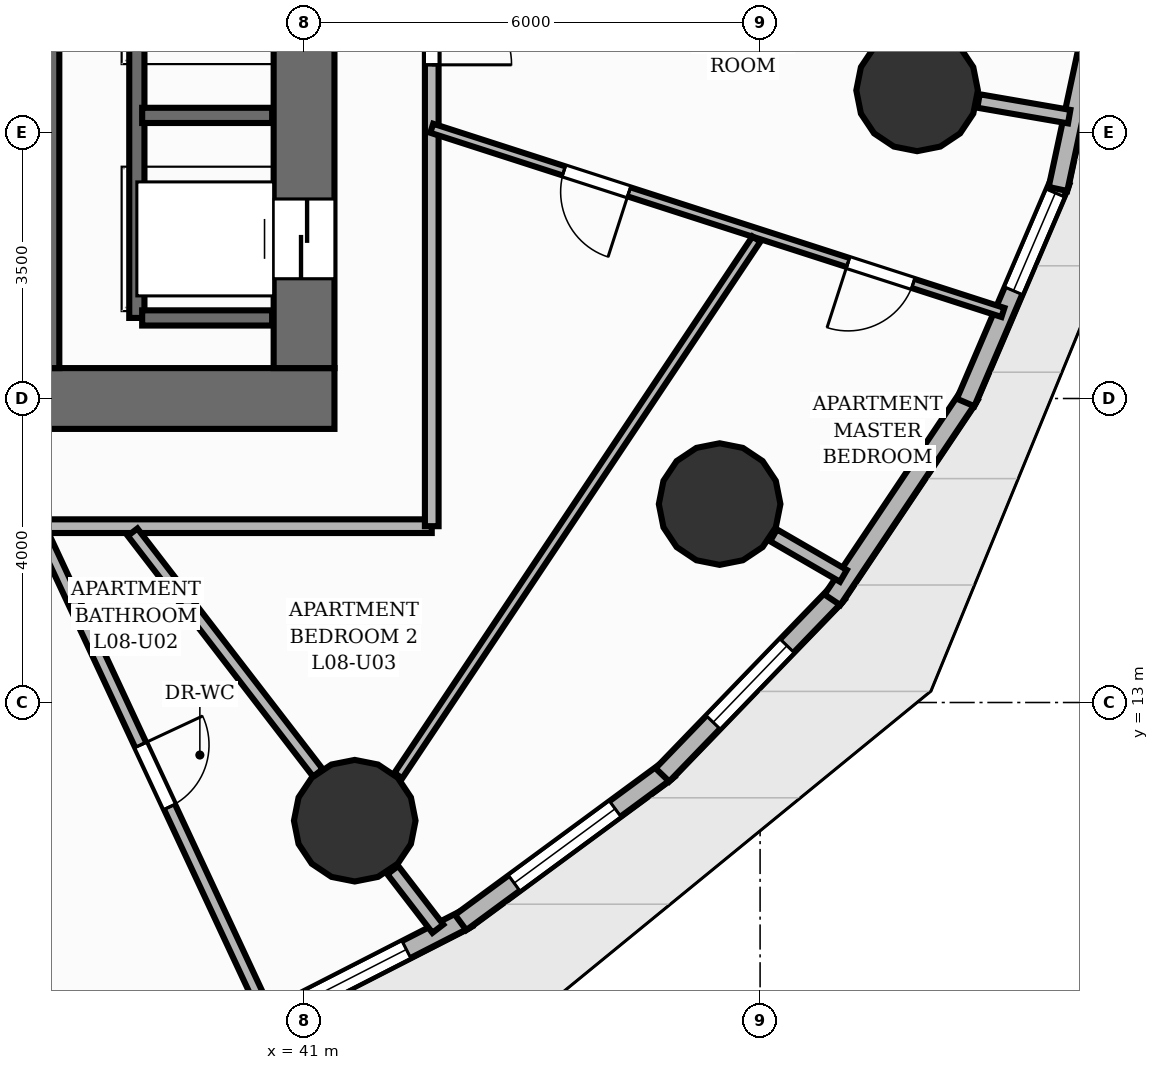
"""IFC4 building model, lengths in metres.
Left out: names, types, materials, properties, quantities, classifications, styles, units other than length and angle.
Written with IfcOpenShell. Run it as: python <this file> out.ifc"""

import sys

from ifc_helpers import new_model, si_unit, direction, frame, frame_2d, origin, origin_2d, place, context, subcontext, project, spatial, rectangle, circle, extrude, element, fill, save


model = new_model("IFC4")
c1 = context("Model", 3, precision=1e-05, world=origin(), true_north=direction((0.0, 1.0)))
c2 = subcontext(c1, "Body", "Model", "MODEL_VIEW")
j1 = project(units=[si_unit("LENGTHUNIT", "METRE"), si_unit("PLANEANGLEUNIT", "RADIAN")], contexts=[c1])
p1 = place(None, origin())
s1 = spatial("IfcSite", under=j1, at=p1, CompositionType="ELEMENT")
p2 = place(p1, origin())
s2 = spatial("IfcBuilding", under=s1, at=p2, CompositionType="ELEMENT")
p3 = place(p2, frame((0.0, 0.0, 31.2)))
s3 = spatial("IfcBuildingStorey", under=s2, at=p3, CompositionType="ELEMENT", Elevation=31.2)
p4 = place(p3, frame((22.6, 17.0, 0.0), z_axis=(0.0, 0.0, 1.0), x_axis=(1.0, 0.0, 0.0)))
e1 = element("IfcWall", 1, at=p4, inside=s3, PredefinedType="SHEAR", context=c2, shape_type="SweptSolid", body=[
    extrude(rectangle(XDim=18.8, YDim=0.8, at=frame_2d((9.4, 0.0))), origin(), (0.0, 0.0, 1.0), 3.2),
])
p5 = place(p4, frame((5.9, 0.0, 0.0)))
e2 = element("IfcOpeningElement", 2, at=p5, cuts=e1, PredefinedType="OPENING", context=c2, shape_type="SweptSolid", body=[
    extrude(rectangle(XDim=1.1, YDim=2.15, at=frame_2d((0.55, 1.075))), frame((0.0, 0.41, 0.0), z_axis=(0.0, -1.0, 0.0), x_axis=(1.0, 0.0, 0.0)), (0.0, 0.0, 1.0), 0.82),
])
p6 = place(p4, frame((9.45, 0.0, 0.0)))
e3 = element("IfcOpeningElement", 3, at=p6, cuts=e1, PredefinedType="OPENING", context=c2, shape_type="SweptSolid", body=[
    extrude(rectangle(XDim=0.9, YDim=2.1, at=frame_2d((0.45, 1.05))), frame((0.0, 0.41, 0.0), z_axis=(0.0, -1.0, 0.0), x_axis=(1.0, 0.0, 0.0)), (0.0, 0.0, 1.0), 0.82),
])
p7 = place(p3, frame((41.0, 17.4, 0.0), z_axis=(0.0, 0.0, 1.0), x_axis=(0.0, 1.0, 0.0)))
e4 = element("IfcWall", 4, at=p7, inside=s3, PredefinedType="SHEAR", context=c2, shape_type="SweptSolid", body=[
    extrude(rectangle(XDim=13.2, YDim=0.8, at=frame_2d((6.6, 0.0))), origin(), (0.0, 0.0, 1.0), 3.2),
])
p8 = place(p7, frame((1.175, 0.0, 0.0)))
e5 = element("IfcOpeningElement", 5, at=p8, cuts=e4, PredefinedType="OPENING", context=c2, shape_type="SweptSolid", body=[
    extrude(rectangle(XDim=1.05, YDim=2.15, at=frame_2d((0.525, 1.075))), frame((0.0, 0.41, 0.0), z_axis=(0.0, -1.0, 0.0), x_axis=(1.0, 0.0, 0.0)), (0.0, 0.0, 1.0), 0.82),
])
p9 = place(p7, frame((4.425, 0.0, 0.0)))
e6 = element("IfcOpeningElement", 6, at=p9, cuts=e4, PredefinedType="OPENING", context=c2, shape_type="SweptSolid", body=[
    extrude(rectangle(XDim=1.05, YDim=2.15, at=frame_2d((0.525, 1.075))), frame((0.0, 0.41, 0.0), z_axis=(0.0, -1.0, 0.0), x_axis=(1.0, 0.0, 0.0)), (0.0, 0.0, 1.0), 0.82),
])
p10 = place(p7, frame((7.725, 0.0, 0.0)))
e7 = element("IfcOpeningElement", 7, at=p10, cuts=e4, PredefinedType="OPENING", context=c2, shape_type="SweptSolid", body=[
    extrude(rectangle(XDim=1.05, YDim=2.15, at=frame_2d((0.525, 1.075))), frame((0.0, 0.41, 0.0), z_axis=(0.0, -1.0, 0.0), x_axis=(1.0, 0.0, 0.0)), (0.0, 0.0, 1.0), 0.82),
])
p11 = place(p7, frame((10.975, 0.0, 0.0)))
e8 = element("IfcOpeningElement", 8, at=p11, cuts=e4, PredefinedType="OPENING", context=c2, shape_type="SweptSolid", body=[
    extrude(rectangle(XDim=1.05, YDim=2.15, at=frame_2d((0.525, 1.075))), frame((0.0, 0.41, 0.0), z_axis=(0.0, -1.0, 0.0), x_axis=(1.0, 0.0, 0.0)), (0.0, 0.0, 1.0), 0.82),
])
p12 = place(p3, frame((37.5, 17.4, 0.0), z_axis=(0.0, 0.0, 1.0), x_axis=(0.0, 1.0, 0.0)))
e9 = element("IfcWall", 9, at=p12, inside=s3, PredefinedType="SHEAR", context=c2, shape_type="SweptSolid", body=[
    extrude(rectangle(XDim=13.2, YDim=0.56, at=frame_2d((6.6, 0.0))), origin(), (0.0, 0.0, 1.0), 3.2),
])
for number, where, z_axis, x_axis in (
    (10, (41.667, 11.445, 0.0), (0.0, 0.0, 1.0), (1.0, 0.0, 0.0)),
    (11, (46.468, 15.611, 0.0), (0.0, 0.0, 1.0), (1.0, 0.0, 0.0)),
    (12, (49.066, 21.054, 0.0), (0.0, 0.0, 1.0), (1.0, 0.0, 0.0)),
):
    element("IfcColumn", number, at=place(p3, frame(where, z_axis=z_axis, x_axis=x_axis)), inside=s3, PredefinedType="COLUMN", context=c2, shape_type="SweptSolid", body=[
        extrude(circle(Radius=0.8, at=origin_2d()), origin(), (0.0, 0.0, 1.0), 3.2),
    ])
p13 = place(p3, frame((43.153, 10.164, 0.0), z_axis=(0.0, 0.0, 1.0), x_axis=(-0.890260122421, -0.455452428281, 0.0)))
e13 = element("IfcWall", 13, at=p13, inside=s3, PredefinedType="SOLIDWALL", context=c2, shape_type="SweptSolid", body=[
    extrude(rectangle(XDim=3.465, YDim=0.25, at=frame_2d((1.732, 0.0))), origin(), (0.0, 0.0, 1.0), 2.96),
])
p14 = place(p13, frame((0.907, 0.0, 0.85)))
e14 = element("IfcOpeningElement", 14, at=p14, cuts=e13, PredefinedType="OPENING", context=c2, shape_type="SweptSolid", body=[
    extrude(rectangle(XDim=1.65, YDim=1.55, at=frame_2d((0.825, 0.775))), frame((0.0, 0.135, 0.0), z_axis=(0.0, -1.0, 0.0), x_axis=(1.0, 0.0, 0.0)), (0.0, 0.0, 1.0), 0.27),
])
p15 = place(p3, frame((45.798, 12.12, 0.0), z_axis=(0.0, 0.0, 1.0), x_axis=(-0.805405938507, -0.592723606935, 0.0)))
e15 = element("IfcWall", 15, at=p15, inside=s3, PredefinedType="SOLIDWALL", context=c2, shape_type="SweptSolid", body=[
    extrude(rectangle(XDim=3.399, YDim=0.25, at=frame_2d((1.699, 0.0))), origin(), (0.0, 0.0, 1.0), 2.96),
])
p16 = place(p15, frame((0.875, 0.0, 0.85)))
e16 = element("IfcOpeningElement", 16, at=p16, cuts=e15, PredefinedType="OPENING", context=c2, shape_type="SweptSolid", body=[
    extrude(rectangle(XDim=1.65, YDim=1.55, at=frame_2d((0.825, 0.775))), frame((0.0, 0.135, 0.0), z_axis=(0.0, -1.0, 0.0), x_axis=(1.0, 0.0, 0.0)), (0.0, 0.0, 1.0), 0.27),
])
p17 = place(p3, frame((48.021, 14.438, 0.0), z_axis=(0.0, 0.0, 1.0), x_axis=(-0.694392538781, -0.719596416115, 0.0)))
e17 = element("IfcWall", 17, at=p17, inside=s3, PredefinedType="SOLIDWALL", context=c2, shape_type="SweptSolid", body=[
    extrude(rectangle(XDim=3.323, YDim=0.25, at=frame_2d((1.661, 0.0))), origin(), (0.0, 0.0, 1.0), 2.96),
])
p18 = place(p17, frame((0.961, 0.0, 0.85)))
e18 = element("IfcOpeningElement", 18, at=p18, cuts=e17, PredefinedType="OPENING", context=c2, shape_type="SweptSolid", body=[
    extrude(rectangle(XDim=1.4, YDim=1.55, at=frame_2d((0.7, 0.775))), frame((0.0, 0.135, 0.0), z_axis=(0.0, -1.0, 0.0), x_axis=(1.0, 0.0, 0.0)), (0.0, 0.0, 1.0), 0.27),
])
p19 = place(p3, frame((49.758, 17.047, 0.0), z_axis=(0.0, 0.0, 1.0), x_axis=(-0.556764929833, -0.83067009872, 0.0)))
e19 = element("IfcWall", 19, at=p19, inside=s3, PredefinedType="SOLIDWALL", context=c2, shape_type="SweptSolid", body=[
    extrude(rectangle(XDim=3.244, YDim=0.25, at=frame_2d((1.622, 0.0))), origin(), (0.0, 0.0, 1.0), 2.96),
])
p20 = place(p3, frame((50.954, 19.865, 0.0), z_axis=(0.0, 0.0, 1.0), x_axis=(-0.393733630937, -0.91922457967, 0.0)))
e20 = element("IfcWall", 20, at=p20, inside=s3, PredefinedType="SOLIDWALL", context=c2, shape_type="SweptSolid", body=[
    extrude(rectangle(XDim=3.174, YDim=0.25, at=frame_2d((1.587, 0.0))), origin(), (0.0, 0.0, 1.0), 2.96),
])
p21 = place(p20, frame((0.175, 0.0, 0.85)))
e21 = element("IfcOpeningElement", 21, at=p21, cuts=e20, PredefinedType="OPENING", context=c2, shape_type="SweptSolid", body=[
    extrude(rectangle(XDim=1.4, YDim=1.55, at=frame_2d((0.7, 0.775))), frame((0.0, 0.135, 0.0), z_axis=(0.0, -1.0, 0.0), x_axis=(1.0, 0.0, 0.0)), (0.0, 0.0, 1.0), 0.27),
])
p22 = place(p3, frame((51.573, 22.808, 0.0), z_axis=(0.0, 0.0, 1.0), x_axis=(-0.209668000253, -0.977772637002, 0.0)))
e22 = element("IfcWall", 22, at=p22, inside=s3, PredefinedType="SOLIDWALL", context=c2, shape_type="SweptSolid", body=[
    extrude(rectangle(XDim=3.121, YDim=0.25, at=frame_2d((1.56, 0.0))), origin(), (0.0, 0.0, 1.0), 2.96),
])
p23 = place(p3, frame((38.8, 18.06, 0.0), z_axis=(0.0, 0.0, 1.0), x_axis=(0.0, 1.0, 0.0)))
e23 = element("IfcWall", 23, at=p23, inside=s3, PredefinedType="SHEAR", context=c2, shape_type="SweptSolid", body=[
    extrude(rectangle(XDim=11.88, YDim=0.2, at=frame_2d((5.94, 0.0))), origin(), (0.0, 0.0, 1.0), 3.2),
])
for number, where, z_axis, x_axis in (
    (24, (38.87, 18.06, 0.0), (0.0, 0.0, 1.0), (1.0, 0.0, 0.0)),
    (25, (38.87, 20.725, 0.0), (0.0, 0.0, 1.0), (1.0, 0.0, 0.0)),
):
    element("IfcWall", number, at=place(p3, frame(where, z_axis=z_axis, x_axis=x_axis)), inside=s3, PredefinedType="SHEAR", context=c2, shape_type="SweptSolid", body=[
        extrude(rectangle(XDim=1.71, YDim=0.2, at=frame_2d((0.855, 0.0))), origin(), (0.0, 0.0, 1.0), 3.2),
    ])
p24 = place(p3, frame((42.167, 10.795, 0.0), z_axis=(0.0, 0.0, 1.0), x_axis=(0.609953343804, -0.792437327732, 0.0)))
e26 = element("IfcWall", 26, at=p24, inside=s3, PredefinedType="PARTITIONING", context=c2, shape_type="SweptSolid", body=[
    extrude(rectangle(XDim=0.973, YDim=0.18, at=frame_2d((0.486, 0.0))), origin(), (0.0, 0.0, 1.0), 2.178),
])
p25 = place(p3, frame((47.177, 15.2, 0.0), z_axis=(0.0, 0.0, 1.0), x_axis=(0.865001274409, -0.501769663562, 0.0)))
e27 = element("IfcWall", 27, at=p25, inside=s3, PredefinedType="PARTITIONING", context=c2, shape_type="SweptSolid", body=[
    extrude(rectangle(XDim=1.063, YDim=0.18, at=frame_2d((0.531, 0.0))), origin(), (0.0, 0.0, 1.0), 2.178),
])
p26 = place(p3, frame((49.874, 20.915, 0.0), z_axis=(0.0, 0.0, 1.0), x_axis=(0.985412344637, -0.170183756676, 0.0)))
e28 = element("IfcWall", 28, at=p26, inside=s3, PredefinedType="PARTITIONING", context=c2, shape_type="SweptSolid", body=[
    extrude(rectangle(XDim=1.211, YDim=0.18, at=frame_2d((0.605, 0.0))), origin(), (0.0, 0.0, 1.0), 2.178),
])
p27 = place(p3, frame((42.68, 15.32, 0.0), z_axis=(0.0, 0.0, 1.0), x_axis=(-1.0, 0.0, 0.0)))
e29 = element("IfcWall", 29, at=p27, inside=s3, PredefinedType="PARTITIONING", context=c2, shape_type="SweptSolid", body=[
    extrude(rectangle(XDim=8.823, YDim=0.18, at=frame_2d((4.411, 0.0))), origin(), (0.0, 0.0, 1.0), 2.955),
])
p28 = place(p27, frame((6.462, 0.0, 0.0)))
e30 = element("IfcOpeningElement", 30, at=p28, cuts=e29, PredefinedType="OPENING", context=c2, shape_type="SweptSolid", body=[
    extrude(rectangle(XDim=1.05, YDim=2.15, at=frame_2d((0.525, 1.075))), frame((0.0, 0.1, 0.0), z_axis=(0.0, -1.0, 0.0), x_axis=(1.0, 0.0, 0.0)), (0.0, 0.0, 1.0), 0.2),
])
p29 = place(p3, frame((42.68, 32.68, 0.0), z_axis=(0.0, 0.0, 1.0), x_axis=(0.0, -1.0, 0.0)))
e31 = element("IfcWall", 31, at=p29, inside=s3, PredefinedType="PARTITIONING", context=c2, shape_type="SweptSolid", body=[
    extrude(rectangle(XDim=17.36, YDim=0.18, at=frame_2d((8.68, 0.0))), origin(), (0.0, 0.0, 1.0), 2.955),
])
p30 = place(p29, frame((10.24, 0.0, 0.0)))
e32 = element("IfcOpeningElement", 32, at=p30, cuts=e31, PredefinedType="OPENING", context=c2, shape_type="SweptSolid", body=[
    extrude(rectangle(XDim=1.05, YDim=2.15, at=frame_2d((0.525, 1.075))), frame((0.0, 0.1, 0.0), z_axis=(0.0, -1.0, 0.0), x_axis=(1.0, 0.0, 0.0)), (0.0, 0.0, 1.0), 0.2),
])
p31 = place(p3, frame((37.55, 15.229, 0.0), z_axis=(0.0, 0.0, 1.0), x_axis=(0.422745211231, -0.906248578692, 0.0)))
e33 = element("IfcWall", 33, at=p31, inside=s3, PredefinedType="PLUMBINGWALL", context=c2, shape_type="SweptSolid", body=[
    extrude(rectangle(XDim=7.052, YDim=0.16, at=frame_2d((3.526, 0.0))), origin(), (0.0, 0.0, 1.0), 2.641),
])
p32 = place(p31, frame((3.076, 0.0, 0.0)))
e34 = element("IfcOpeningElement", 34, at=p32, cuts=e33, PredefinedType="OPENING", context=c2, shape_type="SweptSolid", body=[
    extrude(rectangle(XDim=0.9, YDim=2.1, at=frame_2d((0.45, 1.05))), frame((0.0, 0.09, 0.0), z_axis=(0.0, -1.0, 0.0), x_axis=(1.0, 0.0, 0.0)), (0.0, 0.0, 1.0), 0.18),
])
p33 = place(p3, frame((38.744, 15.241, 0.0), z_axis=(0.0, 0.0, 1.0), x_axis=(0.610097434882, -0.792326397358, 0.0)))
e35 = element("IfcWall", 35, at=p33, inside=s3, PredefinedType="PLUMBINGWALL", context=c2, shape_type="SweptSolid", body=[
    extrude(rectangle(XDim=3.997, YDim=0.16, at=frame_2d((1.998, 0.0))), origin(), (0.0, 0.0, 1.0), 2.178),
])
p34 = place(p3, frame((50.195, 18.132, 0.0), z_axis=(0.0, 0.0, 1.0), x_axis=(-0.951723769721, 0.306955804879, 0.0)))
e36 = element("IfcWall", 36, at=p34, inside=s3, PredefinedType="PARTITIONING", context=c2, shape_type="SweptSolid", body=[
    extrude(rectangle(XDim=7.896, YDim=0.125, at=frame_2d((3.948, 0.0))), origin(), (0.0, 0.0, 1.0), 2.955),
])
p35 = place(p34, frame((1.241, 0.0, 0.0)))
e37 = element("IfcOpeningElement", 37, at=p35, cuts=e36, PredefinedType="OPENING", context=c2, shape_type="SweptSolid", body=[
    extrude(rectangle(XDim=0.9, YDim=2.1, at=frame_2d((0.45, 1.05))), frame((0.0, 0.073, 0.0), z_axis=(0.0, -1.0, 0.0), x_axis=(1.0, 0.0, 0.0)), (0.0, 0.0, 1.0), 0.145),
])
p36 = place(p34, frame((5.169, 0.0, 0.0)))
e38 = element("IfcOpeningElement", 38, at=p36, cuts=e36, PredefinedType="OPENING", context=c2, shape_type="SweptSolid", body=[
    extrude(rectangle(XDim=0.9, YDim=2.1, at=frame_2d((0.45, 1.05))), frame((0.0, 0.073, 0.0), z_axis=(0.0, -1.0, 0.0), x_axis=(1.0, 0.0, 0.0)), (0.0, 0.0, 1.0), 0.145),
])
p37 = place(p3, frame((42.24, 12.037, 0.0), z_axis=(0.0, 0.0, 1.0), x_axis=(0.55508513016, 0.831793543059, 0.0)))
e39 = element("IfcWall", 39, at=p37, inside=s3, PredefinedType="PARTITIONING", context=c2, shape_type="SweptSolid", body=[
    extrude(rectangle(XDim=8.488, YDim=0.125, at=frame_2d((4.244, 0.0))), origin(), (0.0, 0.0, 1.0), 2.328),
])
p38 = place(p14, origin())
e40 = element("IfcWindow", 40, at=p38, inside=s3, PartitioningType="SINGLE_PANEL", PredefinedType="WINDOW", context=c2, shape_type="SweptSolid", body=[
    extrude(rectangle(XDim=1.65, YDim=1.55, at=frame_2d((0.825, 0.775))), frame((0.0, 0.03, 0.0), z_axis=(0.0, -1.0, 0.0), x_axis=(1.0, 0.0, 0.0)), (0.0, 0.0, 1.0), 0.06),
])
fill(e14, e40)
p39 = place(p16, origin())
e41 = element("IfcWindow", 41, at=p39, inside=s3, PartitioningType="SINGLE_PANEL", PredefinedType="WINDOW", context=c2, shape_type="SweptSolid", body=[
    extrude(rectangle(XDim=1.65, YDim=1.55, at=frame_2d((0.825, 0.775))), frame((0.0, 0.03, 0.0), z_axis=(0.0, -1.0, 0.0), x_axis=(1.0, 0.0, 0.0)), (0.0, 0.0, 1.0), 0.06),
])
fill(e16, e41)
p40 = place(p18, origin())
e42 = element("IfcWindow", 42, at=p40, inside=s3, PartitioningType="SINGLE_PANEL", PredefinedType="WINDOW", context=c2, shape_type="SweptSolid", body=[
    extrude(rectangle(XDim=1.4, YDim=1.55, at=frame_2d((0.7, 0.775))), frame((0.0, 0.03, 0.0), z_axis=(0.0, -1.0, 0.0), x_axis=(1.0, 0.0, 0.0)), (0.0, 0.0, 1.0), 0.06),
])
fill(e18, e42)
p41 = place(p21, origin())
e43 = element("IfcWindow", 43, at=p41, inside=s3, PartitioningType="SINGLE_PANEL", PredefinedType="WINDOW", context=c2, shape_type="SweptSolid", body=[
    extrude(rectangle(XDim=1.4, YDim=1.55, at=frame_2d((0.7, 0.775))), frame((0.0, 0.03, 0.0), z_axis=(0.0, -1.0, 0.0), x_axis=(1.0, 0.0, 0.0)), (0.0, 0.0, 1.0), 0.06),
])
fill(e21, e43)
p42 = place(p8, origin())
e44 = element("IfcDoor", 44, at=p42, inside=s3, OperationType="DOUBLE_DOOR_SLIDING", PredefinedType="DOOR", context=c2, shape_type="SweptSolid", body=[
    extrude(rectangle(XDim=1.05, YDim=2.15, at=frame_2d((0.525, 1.075))), frame((0.0, 0.025, 0.0), z_axis=(0.0, -1.0, 0.0), x_axis=(1.0, 0.0, 0.0)), (0.0, 0.0, 1.0), 0.05),
])
fill(e5, e44)
p43 = place(p32, origin())
e45 = element("IfcDoor", 45, at=p43, inside=s3, OperationType="SINGLE_SWING_LEFT", PredefinedType="DOOR", context=c2, shape_type="SweptSolid", body=[
    extrude(rectangle(XDim=0.9, YDim=2.1, at=frame_2d((0.45, 1.05))), frame((0.0, 0.025, 0.0), z_axis=(0.0, -1.0, 0.0), x_axis=(1.0, 0.0, 0.0)), (0.0, 0.0, 1.0), 0.05),
])
fill(e34, e45)
p44 = place(p30, origin())
e46 = element("IfcDoor", 46, at=p44, inside=s3, OperationType="SINGLE_SWING_RIGHT", PredefinedType="DOOR", context=c2, shape_type="SweptSolid", body=[
    extrude(rectangle(XDim=1.05, YDim=2.15, at=frame_2d((0.525, 1.075))), frame((0.0, 0.025, 0.0), z_axis=(0.0, -1.0, 0.0), x_axis=(1.0, 0.0, 0.0)), (0.0, 0.0, 1.0), 0.05),
])
fill(e32, e46)
p45 = place(p35, origin())
e47 = element("IfcDoor", 47, at=p45, inside=s3, OperationType="SINGLE_SWING_RIGHT", PredefinedType="DOOR", context=c2, shape_type="SweptSolid", body=[
    extrude(rectangle(XDim=0.9, YDim=2.1, at=frame_2d((0.45, 1.05))), frame((0.0, 0.025, 0.0), z_axis=(0.0, -1.0, 0.0), x_axis=(1.0, 0.0, 0.0)), (0.0, 0.0, 1.0), 0.05),
])
fill(e37, e47)
p46 = place(p36, origin())
e48 = element("IfcDoor", 48, at=p46, inside=s3, OperationType="SINGLE_SWING_LEFT", PredefinedType="DOOR", context=c2, shape_type="SweptSolid", body=[
    extrude(rectangle(XDim=0.9, YDim=2.1, at=frame_2d((0.45, 1.05))), frame((0.0, 0.025, 0.0), z_axis=(0.0, -1.0, 0.0), x_axis=(1.0, 0.0, 0.0)), (0.0, 0.0, 1.0), 0.05),
])
fill(e38, e48)
save(model, sys.argv[1])
